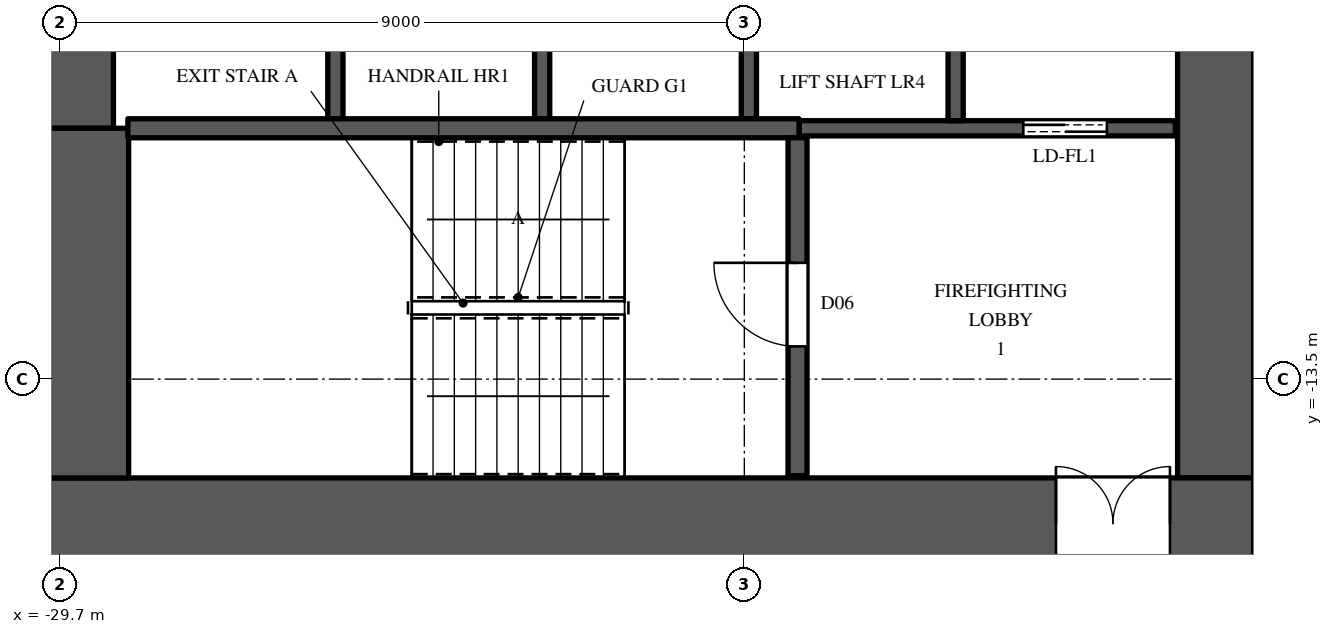
"""IFC4 building model, lengths in metres.
Left out: names, types, materials, properties, quantities, classifications, styles, units other than length and angle.
Written with IfcOpenShell. Run it as: python <this file> out.ifc"""

import sys

from ifc_helpers import new_model, si_unit, direction, frame, frame_2d, origin, place, context, subcontext, project, spatial, rectangle, extrude, element, fill, save


model = new_model("IFC4")
c1 = context("Model", 3, precision=1e-05, world=origin(), true_north=direction((0.0, 1.0)))
c2 = subcontext(c1, "Body", "Model", "MODEL_VIEW")
j1 = project(units=[si_unit("LENGTHUNIT", "METRE"), si_unit("PLANEANGLEUNIT", "RADIAN")], contexts=[c1])
p1 = place(None, origin())
s1 = spatial("IfcSite", under=j1, at=p1, CompositionType="ELEMENT")
p2 = place(p1, origin())
s2 = spatial("IfcBuilding", under=s1, at=p2, CompositionType="ELEMENT")
p3 = place(p2, frame((0.0, 0.0, 95.1)))
s3 = spatial("IfcBuildingStorey", under=s2, at=p3, CompositionType="ELEMENT", Elevation=95.1)
p4 = place(p3, frame((-30.0, -15.4, 0.0), z_axis=(0.0, 0.0, 1.0), x_axis=(1.0, 0.0, 0.0)))
e1 = element("IfcWall", 1, at=p4, inside=s3, PredefinedType="SHEAR", context=c2, shape_type="SweptSolid", body=[
    extrude(rectangle(XDim=16.0, YDim=1.2, at=frame_2d((8.0, 0.0))), origin(), (0.0, 0.0, 1.0), 3.6),
])
p5 = place(p4, frame((13.4, 0.0, 0.0)))
e2 = element("IfcOpeningElement", 2, at=p5, cuts=e1, PredefinedType="OPENING", context=c2, shape_type="SweptSolid", body=[
    extrude(rectangle(XDim=1.5, YDim=2.4, at=frame_2d((0.75, 1.2))), frame((0.0, 0.61, 0.0), z_axis=(0.0, -1.0, 0.0), x_axis=(1.0, 0.0, 0.0)), (0.0, 0.0, 1.0), 1.22),
])
p6 = place(p3, frame((-14.5, -14.8, 0.0), z_axis=(0.0, 0.0, 1.0), x_axis=(0.0, 1.0, 0.0)))
e3 = element("IfcWall", 3, at=p6, inside=s3, PredefinedType="SHEAR", context=c2, shape_type="SweptSolid", body=[
    extrude(rectangle(XDim=29.6, YDim=1.0, at=frame_2d((14.8, 0.0))), origin(), (0.0, 0.0, 1.0), 3.6),
])
p7 = place(p6, frame((8.45, 0.0, 0.0)))
e4 = element("IfcOpeningElement", 4, at=p7, cuts=e3, PredefinedType="OPENING", context=c2, shape_type="SweptSolid", body=[
    extrude(rectangle(XDim=1.5, YDim=2.4, at=frame_2d((0.75, 1.2))), frame((0.0, 0.51, 0.0), z_axis=(0.0, -1.0, 0.0), x_axis=(1.0, 0.0, 0.0)), (0.0, 0.0, 1.0), 1.02),
])
p8 = place(p6, frame((19.65, 0.0, 0.0)))
e5 = element("IfcOpeningElement", 5, at=p8, cuts=e3, PredefinedType="OPENING", context=c2, shape_type="SweptSolid", body=[
    extrude(rectangle(XDim=1.5, YDim=2.4, at=frame_2d((0.75, 1.2))), frame((0.0, 0.51, 0.0), z_axis=(0.0, -1.0, 0.0), x_axis=(1.0, 0.0, 0.0)), (0.0, 0.0, 1.0), 1.02),
])
p9 = place(p6, frame((14.5, 0.0, 0.0)))
e6 = element("IfcOpeningElement", 6, at=p9, cuts=e3, PredefinedType="OPENING", context=c2, shape_type="SweptSolid", body=[
    extrude(rectangle(XDim=0.6, YDim=2.0, at=frame_2d((0.3, 1.0))), frame((0.0, 0.51, 0.0), z_axis=(0.0, -1.0, 0.0), x_axis=(1.0, 0.0, 0.0)), (0.0, 0.0, 1.0), 1.02),
])
p10 = place(p3, frame((-29.5, -10.2, 0.0), z_axis=(0.0, 0.0, 1.0), x_axis=(0.0, 1.0, 0.0)))
e7 = element("IfcWall", 7, at=p10, inside=s3, PredefinedType="SHEAR", context=c2, shape_type="SweptSolid", body=[
    extrude(rectangle(XDim=20.4, YDim=1.0, at=frame_2d((10.2, 0.0))), origin(), (0.0, 0.0, 1.0), 3.6),
])
p11 = place(p3, frame((-29.4, -14.8, 0.0), z_axis=(0.0, 0.0, 1.0), x_axis=(0.0, 1.0, 0.0)))
e8 = element("IfcWall", 8, at=p11, inside=s3, PredefinedType="SHEAR", context=c2, shape_type="SweptSolid", body=[
    extrude(rectangle(XDim=4.6, YDim=1.2, at=frame_2d((2.3, 0.0))), origin(), (0.0, 0.0, 1.0), 3.6),
])
for number, where, z_axis, x_axis in (
    (9, (-26.08, -10.075, 0.0), (0.0, 0.0, 1.0), (0.0, 1.0, 0.0)),
    (10, (-23.36, -10.075, 0.0), (0.0, 0.0, 1.0), (0.0, 1.0, 0.0)),
    (11, (-20.64, -10.075, 0.0), (0.0, 0.0, 1.0), (0.0, 1.0, 0.0)),
):
    element("IfcWall", number, at=place(p3, frame(where, z_axis=z_axis, x_axis=x_axis)), inside=s3, PredefinedType="SHEAR", context=c2, shape_type="SweptSolid", body=[
        extrude(rectangle(XDim=2.575, YDim=0.2, at=frame_2d((1.288, 0.0))), origin(), (0.0, 0.0, 1.0), 3.6),
    ])
p12 = place(p3, frame((-19.98, -10.2, 0.0), z_axis=(0.0, 0.0, 1.0), x_axis=(1.0, 0.0, 0.0)))
e12 = element("IfcWall", 12, at=p12, inside=s3, PredefinedType="SHEAR", context=c2, shape_type="SweptSolid", body=[
    extrude(rectangle(XDim=4.95, YDim=0.2, at=frame_2d((2.475, 0.0))), origin(), (0.0, 0.0, 1.0), 3.3),
])
p13 = place(p12, frame((2.95, 0.0, 0.0)))
e13 = element("IfcOpeningElement", 13, at=p13, cuts=e12, PredefinedType="OPENING", context=c2, shape_type="SweptSolid", body=[
    extrude(rectangle(XDim=1.1, YDim=2.2, at=frame_2d((0.55, 1.1))), frame((0.0, 0.11, 0.0), z_axis=(0.0, -1.0, 0.0), x_axis=(1.0, 0.0, 0.0)), (0.0, 0.0, 1.0), 0.22),
])
p14 = place(p3, frame((-17.92, -10.1, 0.0), z_axis=(0.0, 0.0, 1.0), x_axis=(0.0, 1.0, 0.0)))
e14 = element("IfcWall", 14, at=p14, inside=s3, PredefinedType="SHEAR", context=c2, shape_type="SweptSolid", body=[
    extrude(rectangle(XDim=2.6, YDim=0.2, at=frame_2d((1.3, 0.0))), origin(), (0.0, 0.0, 1.0), 3.6),
])
p15 = place(p3, frame((-28.81, -10.2, 0.0), z_axis=(0.0, 0.0, 1.0), x_axis=(1.0, 0.0, 0.0)))
e15 = element("IfcWall", 15, at=p15, inside=s3, PredefinedType="SHEAR", context=c2, shape_type="SweptSolid", body=[
    extrude(rectangle(XDim=8.83, YDim=0.25, at=frame_2d((4.415, 0.0))), origin(), (0.0, 0.0, 1.0), 3.3),
])
p16 = place(p3, frame((-20.0, -14.77, 0.0), z_axis=(0.0, 0.0, 1.0), x_axis=(0.0, 1.0, 0.0)))
e16 = element("IfcWall", 16, at=p16, inside=s3, PredefinedType="SHEAR", context=c2, shape_type="SweptSolid", body=[
    extrude(rectangle(XDim=4.445, YDim=0.25, at=frame_2d((2.223, 0.0))), origin(), (0.0, 0.0, 1.0), 3.3),
])
p17 = place(p16, frame((1.7, 0.0, 0.0)))
e17 = element("IfcOpeningElement", 17, at=p17, cuts=e16, PredefinedType="OPENING", context=c2, shape_type="SweptSolid", body=[
    extrude(rectangle(XDim=1.1, YDim=2.2, at=frame_2d((0.55, 1.1))), frame((0.0, 0.135, 0.0), z_axis=(0.0, -1.0, 0.0), x_axis=(1.0, 0.0, 0.0)), (0.0, 0.0, 1.0), 0.27),
])
p18 = place(p17, origin())
e18 = element("IfcDoor", 18, at=p18, inside=s3, OperationType="SINGLE_SWING_RIGHT", PredefinedType="DOOR", context=c2, shape_type="SweptSolid", body=[
    extrude(rectangle(XDim=1.1, YDim=2.2, at=frame_2d((0.55, 1.1))), frame((0.0, 0.025, 0.0), z_axis=(0.0, -1.0, 0.0), x_axis=(1.0, 0.0, 0.0)), (0.0, 0.0, 1.0), 0.05),
])
fill(e17, e18)
p19 = place(p13, origin())
e19 = element("IfcDoor", 19, at=p19, inside=s3, OperationType="DOUBLE_DOOR_SLIDING", PredefinedType="DOOR", context=c2, shape_type="SweptSolid", body=[
    extrude(rectangle(XDim=1.1, YDim=2.2, at=frame_2d((0.55, 1.1))), frame((0.0, 0.025, 0.0), z_axis=(0.0, -1.0, 0.0), x_axis=(1.0, 0.0, 0.0)), (0.0, 0.0, 1.0), 0.05),
])
fill(e13, e19)
p20 = place(p5, origin())
e20 = element("IfcDoor", 20, at=p20, inside=s3, OperationType="DOUBLE_DOOR_SINGLE_SWING", PredefinedType="DOOR", context=c2, shape_type="SweptSolid", body=[
    extrude(rectangle(XDim=1.5, YDim=2.4, at=frame_2d((0.75, 1.2))), frame((0.0, 0.025, 0.0), z_axis=(0.0, -1.0, 0.0), x_axis=(1.0, 0.0, 0.0)), (0.0, 0.0, 1.0), 0.05),
])
fill(e2, e20)
save(model, sys.argv[1])
